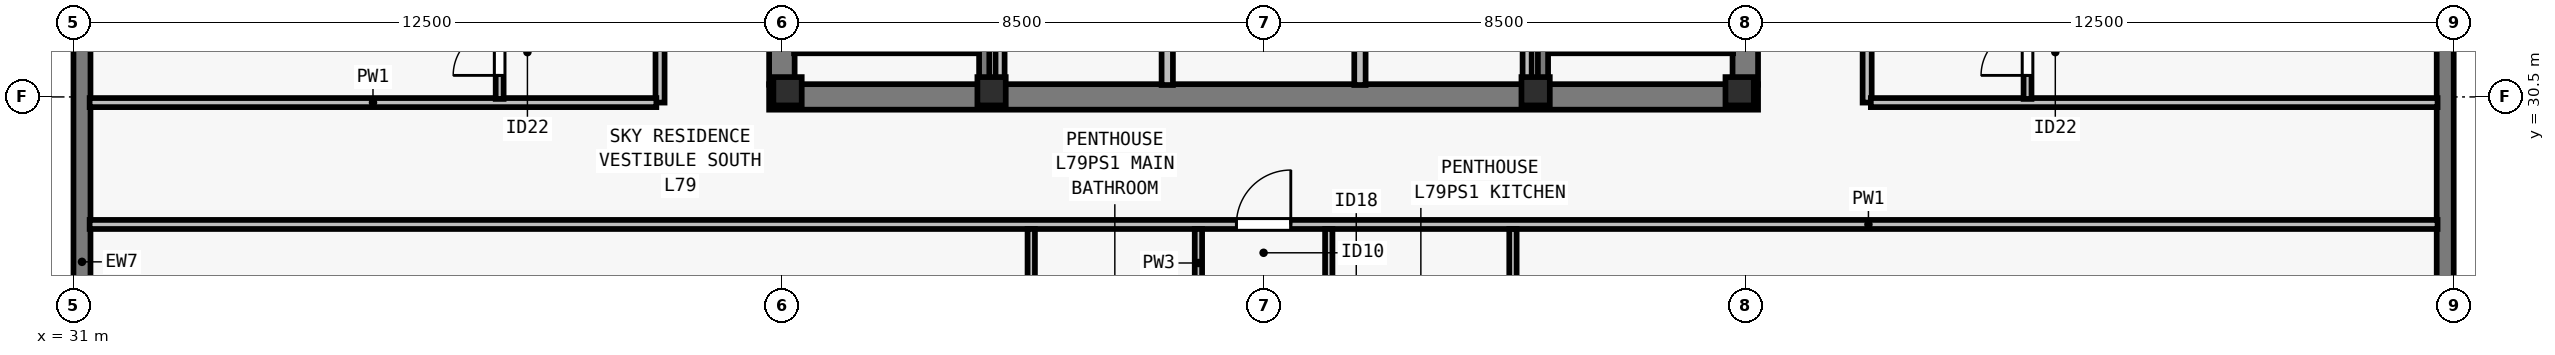
"""IFC4 building model, lengths in metres.
Left out: names, types, materials, properties, quantities, classifications, styles, units other than length and angle.
Written with IfcOpenShell. Run it as: python <this file> out.ifc"""

import sys

from ifc_helpers import new_model, si_unit, direction, frame, frame_2d, origin, origin_2d, place, context, subcontext, project, spatial, rectangle, i_section, extrude, element, fill, save


model = new_model("IFC4")
c1 = context("Model", 3, precision=1e-05, world=origin(), true_north=direction((0.0, 1.0)))
c2 = subcontext(c1, "Body", "Model", "MODEL_VIEW")
j1 = project(units=[si_unit("LENGTHUNIT", "METRE"), si_unit("PLANEANGLEUNIT", "RADIAN")], contexts=[c1])
p1 = place(None, origin())
s1 = spatial("IfcSite", under=j1, at=p1, CompositionType="ELEMENT")
p2 = place(p1, origin())
s2 = spatial("IfcBuilding", under=s1, at=p2, CompositionType="ELEMENT")
p3 = place(p2, frame((0.0, 0.0, 287.5)))
s3 = spatial("IfcBuildingStorey", under=s2, at=p3, CompositionType="ELEMENT", Elevation=287.5)
for number, where, z_axis, x_axis in (
    (1, (43.6, 30.6, 0.0), (0.0, 0.0, 1.0), (1.0, 0.0, 0.0)),
    (2, (47.2, 30.6, 0.0), (0.0, 0.0, 1.0), (1.0, 0.0, 0.0)),
    (3, (56.8, 30.6, 0.0), (0.0, 0.0, 1.0), (1.0, 0.0, 0.0)),
    (4, (60.4, 30.6, 0.0), (0.0, 0.0, 1.0), (1.0, 0.0, 0.0)),
):
    element("IfcColumn", number, at=place(p3, frame(where, z_axis=z_axis, x_axis=x_axis)), inside=s3, PredefinedType="COLUMN", context=c2, shape_type="SweptSolid", body=[
        extrude(i_section(OverallWidth=0.5, OverallDepth=0.5, WebThickness=0.028, FlangeThickness=0.045, at=origin_2d()), origin(), (0.0, 0.0, 1.0), 3.5),
    ])
p4 = place(p3, frame((31.15, 23.5, 0.0), z_axis=(0.0, 0.0, 1.0), x_axis=(0.0, 1.0, 0.0)))
e5 = element("IfcWall", 5, at=p4, inside=s3, PredefinedType="SOLIDWALL", context=c2, shape_type="SweptSolid", body=[
    extrude(rectangle(XDim=30.722, YDim=0.3, at=frame_2d((15.361, 0.0))), origin(), (0.0, 0.0, 1.0), 3.29),
])
p5 = place(p4, frame((8.331, 0.0, 0.8)))
e6 = element("IfcOpeningElement", 6, at=p5, cuts=e5, PredefinedType="OPENING", context=c2, shape_type="SweptSolid", body=[
    extrude(rectangle(XDim=1.65, YDim=1.758, at=frame_2d((0.825, 0.879))), frame((0.0, 0.16, 0.0), z_axis=(0.0, -1.0, 0.0), x_axis=(1.0, 0.0, 0.0)), (0.0, 0.0, 1.0), 0.32),
])
p6 = place(p4, frame((12.442, 0.0, 0.8)))
e7 = element("IfcOpeningElement", 7, at=p6, cuts=e5, PredefinedType="OPENING", context=c2, shape_type="SweptSolid", body=[
    extrude(rectangle(XDim=2.0, YDim=1.758, at=frame_2d((1.0, 0.879))), frame((0.0, 0.16, 0.0), z_axis=(0.0, -1.0, 0.0), x_axis=(1.0, 0.0, 0.0)), (0.0, 0.0, 1.0), 0.32),
])
p7 = place(p4, frame((17.304, 0.0, 0.8)))
e8 = element("IfcOpeningElement", 8, at=p7, cuts=e5, PredefinedType="OPENING", context=c2, shape_type="SweptSolid", body=[
    extrude(rectangle(XDim=1.65, YDim=1.758, at=frame_2d((0.825, 0.879))), frame((0.0, 0.16, 0.0), z_axis=(0.0, -1.0, 0.0), x_axis=(1.0, 0.0, 0.0)), (0.0, 0.0, 1.0), 0.32),
])
p8 = place(p4, frame((20.967, 0.0, 0.8)))
e9 = element("IfcOpeningElement", 9, at=p8, cuts=e5, PredefinedType="OPENING", context=c2, shape_type="SweptSolid", body=[
    extrude(rectangle(XDim=2.0, YDim=1.758, at=frame_2d((1.0, 0.879))), frame((0.0, 0.16, 0.0), z_axis=(0.0, -1.0, 0.0), x_axis=(1.0, 0.0, 0.0)), (0.0, 0.0, 1.0), 0.32),
])
p9 = place(p4, frame((26.63, 0.0, 0.8)))
e10 = element("IfcOpeningElement", 10, at=p9, cuts=e5, PredefinedType="OPENING", context=c2, shape_type="SweptSolid", body=[
    extrude(rectangle(XDim=0.9, YDim=1.75, at=frame_2d((0.45, 0.875))), frame((0.0, 0.16, 0.0), z_axis=(0.0, -1.0, 0.0), x_axis=(1.0, 0.0, 0.0)), (0.0, 0.0, 1.0), 0.32),
])
p10 = place(p3, frame((72.85, 54.5, 0.0), z_axis=(0.0, 0.0, 1.0), x_axis=(0.0, -1.0, 0.0)))
e11 = element("IfcWall", 11, at=p10, inside=s3, PredefinedType="SOLIDWALL", context=c2, shape_type="SweptSolid", body=[
    extrude(rectangle(XDim=30.722, YDim=0.3, at=frame_2d((15.361, 0.0))), origin(), (0.0, 0.0, 1.0), 3.29),
])
p11 = place(p10, frame((8.331, 0.0, 0.8)))
e12 = element("IfcOpeningElement", 12, at=p11, cuts=e11, PredefinedType="OPENING", context=c2, shape_type="SweptSolid", body=[
    extrude(rectangle(XDim=1.65, YDim=1.758, at=frame_2d((0.825, 0.879))), frame((0.0, 0.16, 0.0), z_axis=(0.0, -1.0, 0.0), x_axis=(1.0, 0.0, 0.0)), (0.0, 0.0, 1.0), 0.32),
])
p12 = place(p10, frame((11.593, 0.0, 0.8)))
e13 = element("IfcOpeningElement", 13, at=p12, cuts=e11, PredefinedType="OPENING", context=c2, shape_type="SweptSolid", body=[
    extrude(rectangle(XDim=2.0, YDim=1.758, at=frame_2d((1.0, 0.879))), frame((0.0, 0.16, 0.0), z_axis=(0.0, -1.0, 0.0), x_axis=(1.0, 0.0, 0.0)), (0.0, 0.0, 1.0), 0.32),
])
p13 = place(p10, frame((16.455, 0.0, 0.8)))
e14 = element("IfcOpeningElement", 14, at=p13, cuts=e11, PredefinedType="OPENING", context=c2, shape_type="SweptSolid", body=[
    extrude(rectangle(XDim=1.65, YDim=1.758, at=frame_2d((0.825, 0.879))), frame((0.0, 0.16, 0.0), z_axis=(0.0, -1.0, 0.0), x_axis=(1.0, 0.0, 0.0)), (0.0, 0.0, 1.0), 0.32),
])
p14 = place(p10, frame((20.967, 0.0, 0.8)))
e15 = element("IfcOpeningElement", 15, at=p14, cuts=e11, PredefinedType="OPENING", context=c2, shape_type="SweptSolid", body=[
    extrude(rectangle(XDim=2.0, YDim=1.758, at=frame_2d((1.0, 0.879))), frame((0.0, 0.16, 0.0), z_axis=(0.0, -1.0, 0.0), x_axis=(1.0, 0.0, 0.0)), (0.0, 0.0, 1.0), 0.32),
])
p15 = place(p3, frame((43.275, 30.5, 0.0), z_axis=(0.0, 0.0, 1.0), x_axis=(1.0, 0.0, 0.0)))
e16 = element("IfcWall", 16, at=p15, inside=s3, PredefinedType="SHEAR", context=c2, shape_type="SweptSolid", body=[
    extrude(rectangle(XDim=17.45, YDim=0.45, at=frame_2d((8.725, 0.0))), origin(), (0.0, 0.0, 1.0), 3.29),
])
for number, where, z_axis, x_axis in (
    (17, (43.5, 30.715, 0.0), (0.0, 0.0, 1.0), (0.0, 1.0, 0.0)),
    (18, (60.5, 30.715, 0.0), (0.0, 0.0, 1.0), (0.0, 1.0, 0.0)),
):
    element("IfcWall", number, at=place(p3, frame(where, z_axis=z_axis, x_axis=x_axis)), inside=s3, PredefinedType="SHEAR", context=c2, shape_type="SweptSolid", body=[
        extrude(rectangle(XDim=8.035, YDim=0.45, at=frame_2d((4.018, 0.0))), origin(), (0.0, 0.0, 1.0), 3.29),
    ])
p16 = place(p3, frame((50.3, 30.71, 0.0), z_axis=(0.0, 0.0, 1.0), x_axis=(0.0, 1.0, 0.0)))
e19 = element("IfcWall", 19, at=p16, inside=s3, PredefinedType="SOLIDWALL", context=c2, shape_type="SweptSolid", body=[
    extrude(rectangle(XDim=7.905, YDim=0.2, at=frame_2d((3.953, 0.0))), origin(), (0.0, 0.0, 1.0), 3.29),
])
p17 = place(p16, frame((3.34, 0.0, 0.0)))
e20 = element("IfcOpeningElement", 20, at=p17, cuts=e19, PredefinedType="OPENING", context=c2, shape_type="SweptSolid", body=[
    extrude(rectangle(XDim=0.9, YDim=2.12, at=frame_2d((0.45, 1.06))), frame((0.0, 0.11, 0.0), z_axis=(0.0, -1.0, 0.0), x_axis=(1.0, 0.0, 0.0)), (0.0, 0.0, 1.0), 0.22),
])
p18 = place(p3, frame((53.7, 30.71, 0.0), z_axis=(0.0, 0.0, 1.0), x_axis=(0.0, 1.0, 0.0)))
e21 = element("IfcWall", 21, at=p18, inside=s3, PredefinedType="SOLIDWALL", context=c2, shape_type="SweptSolid", body=[
    extrude(rectangle(XDim=7.905, YDim=0.2, at=frame_2d((3.953, 0.0))), origin(), (0.0, 0.0, 1.0), 3.29),
])
p19 = place(p18, frame((3.14, 0.0, 0.0)))
e22 = element("IfcOpeningElement", 22, at=p19, cuts=e21, PredefinedType="OPENING", context=c2, shape_type="SweptSolid", body=[
    extrude(rectangle(XDim=0.9, YDim=2.12, at=frame_2d((0.45, 1.06))), frame((0.0, 0.11, 0.0), z_axis=(0.0, -1.0, 0.0), x_axis=(1.0, 0.0, 0.0)), (0.0, 0.0, 1.0), 0.22),
])
for number, where, z_axis, x_axis in (
    (23, (47.35, 30.71, 0.0), (0.0, 0.0, 1.0), (0.0, 1.0, 0.0)),
    (24, (56.65, 30.71, 0.0), (0.0, 0.0, 1.0), (0.0, 1.0, 0.0)),
):
    element("IfcWall", number, at=place(p3, frame(where, z_axis=z_axis, x_axis=x_axis)), inside=s3, PredefinedType="PARTITIONING", context=c2, shape_type="SweptSolid", body=[
        extrude(rectangle(XDim=7.905, YDim=0.16, at=frame_2d((3.953, 0.0))), origin(), (0.0, 0.0, 1.0), 3.29),
    ])
p20 = place(p3, frame((31.285, 28.25, 0.0), z_axis=(0.0, 0.0, 1.0), x_axis=(1.0, 0.0, 0.0)))
e25 = element("IfcWall", 25, at=p20, inside=s3, PredefinedType="PARTITIONING", context=c2, shape_type="SweptSolid", body=[
    extrude(rectangle(XDim=41.43, YDim=0.16, at=frame_2d((20.715, 0.0))), origin(), (0.0, 0.0, 1.0), 3.009),
])
p21 = place(p20, frame((20.235, 0.0, 0.0)))
e26 = element("IfcOpeningElement", 26, at=p21, cuts=e25, PredefinedType="OPENING", context=c2, shape_type="SweptSolid", body=[
    extrude(rectangle(XDim=0.96, YDim=2.18, at=frame_2d((0.48, 1.09))), frame((0.0, 0.09, 0.0), z_axis=(0.0, -1.0, 0.0), x_axis=(1.0, 0.0, 0.0)), (0.0, 0.0, 1.0), 0.18),
])
p22 = place(p3, frame((41.35, 30.4, 0.0), z_axis=(0.0, 0.0, 1.0), x_axis=(0.0, 1.0, 0.0)))
e27 = element("IfcWall", 27, at=p22, inside=s3, PredefinedType="PARTITIONING", context=c2, shape_type="SweptSolid", body=[
    extrude(rectangle(XDim=17.2, YDim=0.16, at=frame_2d((8.6, 0.0))), origin(), (0.0, 0.0, 1.0), 3.009),
])
p23 = place(p22, frame((8.12, 0.0, 0.0)))
e28 = element("IfcOpeningElement", 28, at=p23, cuts=e27, PredefinedType="OPENING", context=c2, shape_type="SweptSolid", body=[
    extrude(rectangle(XDim=0.96, YDim=2.18, at=frame_2d((0.48, 1.09))), frame((0.0, 0.09, 0.0), z_axis=(0.0, -1.0, 0.0), x_axis=(1.0, 0.0, 0.0)), (0.0, 0.0, 1.0), 0.18),
])
p24 = place(p3, frame((62.65, 30.4, 0.0), z_axis=(0.0, 0.0, 1.0), x_axis=(0.0, 1.0, 0.0)))
e29 = element("IfcWall", 29, at=p24, inside=s3, PredefinedType="PARTITIONING", context=c2, shape_type="SweptSolid", body=[
    extrude(rectangle(XDim=17.2, YDim=0.16, at=frame_2d((8.6, 0.0))), origin(), (0.0, 0.0, 1.0), 3.29),
])
p25 = place(p24, frame((8.12, 0.0, 0.0)))
e30 = element("IfcOpeningElement", 30, at=p25, cuts=e29, PredefinedType="OPENING", context=c2, shape_type="SweptSolid", body=[
    extrude(rectangle(XDim=0.96, YDim=2.18, at=frame_2d((0.48, 1.09))), frame((0.0, 0.09, 0.0), z_axis=(0.0, -1.0, 0.0), x_axis=(1.0, 0.0, 0.0)), (0.0, 0.0, 1.0), 0.18),
])
for number, where, z_axis, x_axis in (
    (31, (31.285, 30.4, 0.0), (0.0, 0.0, 1.0), (1.0, 0.0, 0.0)),
    (32, (62.715, 30.4, 0.0), (0.0, 0.0, 1.0), (1.0, 0.0, 0.0)),
):
    element("IfcWall", number, at=place(p3, frame(where, z_axis=z_axis, x_axis=x_axis)), inside=s3, PredefinedType="PARTITIONING", context=c2, shape_type="SweptSolid", body=[
        extrude(rectangle(XDim=10.0, YDim=0.16, at=frame_2d((5.0, 0.0))), origin(), (0.0, 0.0, 1.0), 3.29),
    ])
p26 = place(p3, frame((47.9, 25.42, 0.0), z_axis=(0.0, 0.0, 1.0), x_axis=(0.0, 1.0, 0.0)))
e33 = element("IfcWall", 33, at=p26, inside=s3, PredefinedType="PLUMBINGWALL", context=c2, shape_type="SweptSolid", body=[
    extrude(rectangle(XDim=2.75, YDim=0.13, at=frame_2d((1.375, 0.0))), origin(), (0.0, 0.0, 1.0), 3.29),
])
p27 = place(p3, frame((50.85, 25.42, 0.0), z_axis=(0.0, 0.0, 1.0), x_axis=(0.0, 1.0, 0.0)))
e34 = element("IfcWall", 34, at=p27, inside=s3, PredefinedType="PLUMBINGWALL", context=c2, shape_type="SweptSolid", body=[
    extrude(rectangle(XDim=2.75, YDim=0.13, at=frame_2d((1.375, 0.0))), origin(), (0.0, 0.0, 1.0), 3.29),
])
p28 = place(p27, frame((0.55, 0.0, 0.0)))
e35 = element("IfcOpeningElement", 35, at=p28, cuts=e34, PredefinedType="OPENING", context=c2, shape_type="SweptSolid", body=[
    extrude(rectangle(XDim=0.85, YDim=2.08, at=frame_2d((0.425, 1.04))), frame((0.0, 0.075, 0.0), z_axis=(0.0, -1.0, 0.0), x_axis=(1.0, 0.0, 0.0)), (0.0, 0.0, 1.0), 0.15),
])
p29 = place(p3, frame((56.4, 25.42, 0.0), z_axis=(0.0, 0.0, 1.0), x_axis=(0.0, 1.0, 0.0)))
e36 = element("IfcWall", 36, at=p29, inside=s3, PredefinedType="PLUMBINGWALL", context=c2, shape_type="SweptSolid", body=[
    extrude(rectangle(XDim=2.75, YDim=0.13, at=frame_2d((1.375, 0.0))), origin(), (0.0, 0.0, 1.0), 3.29),
])
p30 = place(p3, frame((53.15, 25.42, 0.0), z_axis=(0.0, 0.0, 1.0), x_axis=(0.0, 1.0, 0.0)))
e37 = element("IfcWall", 37, at=p30, inside=s3, PredefinedType="PLUMBINGWALL", context=c2, shape_type="SweptSolid", body=[
    extrude(rectangle(XDim=2.75, YDim=0.13, at=frame_2d((1.375, 0.0))), origin(), (0.0, 0.0, 1.0), 3.009),
])
p31 = place(p30, frame((0.55, 0.0, 0.0)))
e38 = element("IfcOpeningElement", 38, at=p31, cuts=e37, PredefinedType="OPENING", context=c2, shape_type="SweptSolid", body=[
    extrude(rectangle(XDim=0.88, YDim=2.1, at=frame_2d((0.44, 1.05))), frame((0.0, 0.075, 0.0), z_axis=(0.0, -1.0, 0.0), x_axis=(1.0, 0.0, 0.0)), (0.0, 0.0, 1.0), 0.15),
])
p32 = place(p3, frame((38.52, 30.465, 0.0), z_axis=(0.0, 0.0, 1.0), x_axis=(0.0, 1.0, 0.0)))
e39 = element("IfcWall", 39, at=p32, inside=s3, PredefinedType="PARTITIONING", context=c2, shape_type="SweptSolid", body=[
    extrude(rectangle(XDim=4.16, YDim=0.14, at=frame_2d((2.08, 0.0))), origin(), (0.0, 0.0, 1.0), 3.29),
])
p33 = place(p32, frame((0.415, 0.0, 0.0)))
e40 = element("IfcOpeningElement", 40, at=p33, cuts=e39, PredefinedType="OPENING", context=c2, shape_type="SweptSolid", body=[
    extrude(rectangle(XDim=0.82, YDim=2.1, at=frame_2d((0.41, 1.05))), frame((0.0, 0.08, 0.0), z_axis=(0.0, -1.0, 0.0), x_axis=(1.0, 0.0, 0.0)), (0.0, 0.0, 1.0), 0.16),
])
p34 = place(p3, frame((65.48, 30.465, 0.0), z_axis=(0.0, 0.0, 1.0), x_axis=(0.0, 1.0, 0.0)))
e41 = element("IfcWall", 41, at=p34, inside=s3, PredefinedType="PARTITIONING", context=c2, shape_type="SweptSolid", body=[
    extrude(rectangle(XDim=4.16, YDim=0.14, at=frame_2d((2.08, 0.0))), origin(), (0.0, 0.0, 1.0), 3.29),
])
p35 = place(p34, frame((0.415, 0.0, 0.0)))
e42 = element("IfcOpeningElement", 42, at=p35, cuts=e41, PredefinedType="OPENING", context=c2, shape_type="SweptSolid", body=[
    extrude(rectangle(XDim=0.82, YDim=2.1, at=frame_2d((0.41, 1.05))), frame((0.0, 0.08, 0.0), z_axis=(0.0, -1.0, 0.0), x_axis=(1.0, 0.0, 0.0)), (0.0, 0.0, 1.0), 0.16),
])
p36 = place(p3, frame((43.715, 31.36, 0.0), z_axis=(0.0, 0.0, 1.0), x_axis=(1.0, 0.0, 0.0)))
e43 = element("IfcWall", 43, at=p36, inside=s3, PredefinedType="SOLIDWALL", context=c2, shape_type="SweptSolid", body=[
    extrude(rectangle(XDim=3.28, YDim=0.18, at=frame_2d((1.64, 0.0))), origin(), (0.0, 0.0, 1.0), 3.29),
])
p37 = place(p3, frame((47.07, 38.78, 0.0), z_axis=(0.0, 0.0, 1.0), x_axis=(0.0, -1.0, 0.0)))
e44 = element("IfcWall", 44, at=p37, inside=s3, PredefinedType="SOLIDWALL", context=c2, shape_type="SweptSolid", body=[
    extrude(rectangle(XDim=8.067, YDim=0.18, at=frame_2d((4.034, 0.0))), origin(), (0.0, 0.0, 1.0), 3.29),
])
p38 = place(p3, frame((57.005, 31.36, 0.0), z_axis=(0.0, 0.0, 1.0), x_axis=(1.0, 0.0, 0.0)))
e45 = element("IfcWall", 45, at=p38, inside=s3, PredefinedType="SOLIDWALL", context=c2, shape_type="SweptSolid", body=[
    extrude(rectangle(XDim=3.28, YDim=0.18, at=frame_2d((1.64, 0.0))), origin(), (0.0, 0.0, 1.0), 3.29),
])
p39 = place(p3, frame((56.93, 38.78, 0.0), z_axis=(0.0, 0.0, 1.0), x_axis=(0.0, -1.0, 0.0)))
e46 = element("IfcWall", 46, at=p39, inside=s3, PredefinedType="SOLIDWALL", context=c2, shape_type="SweptSolid", body=[
    extrude(rectangle(XDim=8.067, YDim=0.18, at=frame_2d((4.034, 0.0))), origin(), (0.0, 0.0, 1.0), 3.29),
])
p40 = place(p21, origin())
e47 = element("IfcDoor", 47, at=p40, inside=s3, OperationType="SINGLE_SWING_RIGHT", PredefinedType="DOOR", context=c2, shape_type="SweptSolid", body=[
    extrude(rectangle(XDim=0.96, YDim=2.18, at=frame_2d((0.48, 1.09))), frame((0.0, 0.025, 0.0), z_axis=(0.0, -1.0, 0.0), x_axis=(1.0, 0.0, 0.0)), (0.0, 0.0, 1.0), 0.05),
])
fill(e26, e47)
p41 = place(p33, origin())
e48 = element("IfcDoor", 48, at=p41, inside=s3, OperationType="SINGLE_SWING_LEFT", PredefinedType="DOOR", context=c2, shape_type="SweptSolid", body=[
    extrude(rectangle(XDim=0.82, YDim=2.1, at=frame_2d((0.41, 1.05))), frame((0.0, 0.025, 0.0), z_axis=(0.0, -1.0, 0.0), x_axis=(1.0, 0.0, 0.0)), (0.0, 0.0, 1.0), 0.05),
])
fill(e40, e48)
p42 = place(p35, origin())
e49 = element("IfcDoor", 49, at=p42, inside=s3, OperationType="SINGLE_SWING_LEFT", PredefinedType="DOOR", context=c2, shape_type="SweptSolid", body=[
    extrude(rectangle(XDim=0.82, YDim=2.1, at=frame_2d((0.41, 1.05))), frame((0.0, 0.025, 0.0), z_axis=(0.0, -1.0, 0.0), x_axis=(1.0, 0.0, 0.0)), (0.0, 0.0, 1.0), 0.05),
])
fill(e42, e49)
save(model, sys.argv[1])
